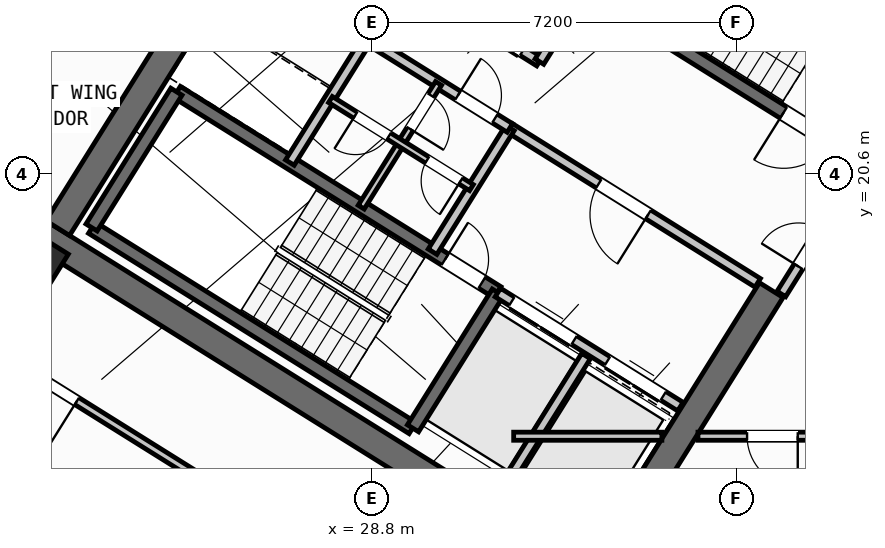
"""IFC4 building model, lengths in metres.
Left out: names, types, materials, properties, quantities, classifications, styles, units other than length and angle.
Written with IfcOpenShell. Run it as: python <this file> out.ifc"""

import sys

from ifc_helpers import new_model, si_unit, direction, frame, frame_2d, origin, origin_2d, place, context, subcontext, project, spatial, rectangle, hollow_rectangle, extrude, source, transform, mapped, element, fill, save


model = new_model("IFC4")
c1 = context("Model", 3, precision=1e-05, world=origin(), true_north=direction((0.0, 1.0)))
c2 = subcontext(c1, "Body", "Model", "MODEL_VIEW")
j1 = project(units=[si_unit("LENGTHUNIT", "METRE"), si_unit("PLANEANGLEUNIT", "RADIAN")], contexts=[c1])
p1 = place(None, origin())
s1 = spatial("IfcSite", under=j1, at=p1, CompositionType="ELEMENT")
p2 = place(p1, origin())
s2 = spatial("IfcBuilding", under=s1, at=p2, CompositionType="ELEMENT")
p3 = place(p2, frame((0.0, 0.0, 155.1)))
s3 = spatial("IfcBuildingStorey", under=s2, at=p3, CompositionType="ELEMENT", Elevation=155.1)
p4 = place(p3, frame((33.366, 12.477, 0.0), z_axis=(0.0, 0.0, 1.0), x_axis=(-0.848047359947, 0.529920442413, 0.0)))
e1 = element("IfcWall", 1, at=p4, inside=s3, PredefinedType="SHEAR", context=c2, shape_type="SweptSolid", body=[
    extrude(rectangle(XDim=13.14, YDim=0.55, at=frame_2d((6.57, 0.0))), origin(), (0.0, 0.0, 1.0), 3.35),
])
p5 = place(p3, frame((36.683, 18.304, 0.0), z_axis=(0.0, 0.0, 1.0), x_axis=(-0.529896466841, -0.848062341122, 0.0)))
e2 = element("IfcWall", 2, at=p5, inside=s3, PredefinedType="SHEAR", context=c2, shape_type="SweptSolid", body=[
    extrude(rectangle(XDim=6.425, YDim=0.55, at=frame_2d((3.212, 0.0))), origin(), (0.0, 0.0, 1.0), 3.35),
])
p6 = place(p3, frame((26.007, 24.976, 0.0), z_axis=(0.0, 0.0, 1.0), x_axis=(-0.529923795287, -0.848045264823, 0.0)))
e3 = element("IfcWall", 3, at=p6, inside=s3, PredefinedType="SHEAR", context=c2, shape_type="SweptSolid", body=[
    extrude(rectangle(XDim=6.425, YDim=0.55, at=frame_2d((3.212, 0.0))), origin(), (0.0, 0.0, 1.0), 3.35),
])
m1 = source(origin(), c2, "Body", "SweptSolid", [
    extrude(hollow_rectangle(XDim=0.9, YDim=0.9, WallThickness=0.036, at=origin_2d()), origin(), (0.0, 0.0, 1.0), 3.6),
])
p7 = place(p3, frame((22.191, 18.87, 0.0), z_axis=(0.0, 0.0, 1.0), x_axis=(-0.848048096156, 0.529919264233, 0.0)))
e4 = element("IfcColumn", 4, at=p7, inside=s3, PredefinedType="COLUMN", context=c2, shape_type="MappedRepresentation", body=[
    mapped(m1, transform((0.0, 0.0, 0.0), scale=1.0)),
])
p8 = place(p3, frame((29.268, 6.429, 0.0), z_axis=(0.0, 0.0, 1.0), x_axis=(-0.848049971435, 0.529916263149, 0.0)))
e5 = element("IfcWall", 5, at=p8, inside=s3, PredefinedType="STANDARD", context=c2, shape_type="SweptSolid", body=[
    extrude(rectangle(XDim=31.588, YDim=0.32, at=frame_2d((15.794, 0.0))), origin(), (0.0, 0.0, 1.0), 3.35),
])
p9 = place(p8, frame((16.362, 0.0, 0.0)))
e6 = element("IfcOpeningElement", 6, at=p9, cuts=e5, PredefinedType="OPENING", context=c2, shape_type="SweptSolid", body=[
    extrude(rectangle(XDim=1.2, YDim=2.15, at=frame_2d((0.6, 1.075))), frame((0.0, 0.17, 0.0), z_axis=(0.0, -1.0, 0.0), x_axis=(1.0, 0.0, 0.0)), (0.0, 0.0, 1.0), 0.34),
])
p10 = place(p8, frame((2.989, 0.0, 0.8)))
e7 = element("IfcOpeningElement", 7, at=p10, cuts=e5, PredefinedType="OPENING", context=c2, shape_type="SweptSolid", body=[
    extrude(rectangle(XDim=2.1, YDim=1.55, at=frame_2d((1.05, 0.775))), frame((0.0, 0.17, 0.0), z_axis=(0.0, -1.0, 0.0), x_axis=(1.0, 0.0, 0.0)), (0.0, 0.0, 1.0), 0.34),
])
p11 = place(p8, frame((8.359, 0.0, 0.8)))
e8 = element("IfcOpeningElement", 8, at=p11, cuts=e5, PredefinedType="OPENING", context=c2, shape_type="SweptSolid", body=[
    extrude(rectangle(XDim=2.1, YDim=1.55, at=frame_2d((1.05, 0.775))), frame((0.0, 0.17, 0.0), z_axis=(0.0, -1.0, 0.0), x_axis=(1.0, 0.0, 0.0)), (0.0, 0.0, 1.0), 0.34),
])
p12 = place(p8, frame((13.284, 0.0, 0.95)))
e9 = element("IfcOpeningElement", 9, at=p12, cuts=e5, PredefinedType="OPENING", context=c2, shape_type="SweptSolid", body=[
    extrude(rectangle(XDim=1.2, YDim=1.4, at=frame_2d((0.6, 0.7))), frame((0.0, 0.17, 0.0), z_axis=(0.0, -1.0, 0.0), x_axis=(1.0, 0.0, 0.0)), (0.0, 0.0, 1.0), 0.34),
])
p13 = place(p8, frame((20.259, 0.0, 0.95)))
e10 = element("IfcOpeningElement", 10, at=p13, cuts=e5, PredefinedType="OPENING", context=c2, shape_type="SweptSolid", body=[
    extrude(rectangle(XDim=1.2, YDim=1.4, at=frame_2d((0.6, 0.7))), frame((0.0, 0.17, 0.0), z_axis=(0.0, -1.0, 0.0), x_axis=(1.0, 0.0, 0.0)), (0.0, 0.0, 1.0), 0.34),
])
p14 = place(p8, frame((22.929, 0.0, 0.95)))
e11 = element("IfcOpeningElement", 11, at=p14, cuts=e5, PredefinedType="OPENING", context=c2, shape_type="SweptSolid", body=[
    extrude(rectangle(XDim=1.2, YDim=1.4, at=frame_2d((0.6, 0.7))), frame((0.0, 0.17, 0.0), z_axis=(0.0, -1.0, 0.0), x_axis=(1.0, 0.0, 0.0)), (0.0, 0.0, 1.0), 0.34),
])
p15 = place(p8, frame((27.481, 0.0, 0.8)))
e12 = element("IfcOpeningElement", 12, at=p15, cuts=e5, PredefinedType="OPENING", context=c2, shape_type="SweptSolid", body=[
    extrude(rectangle(XDim=2.1, YDim=1.55, at=frame_2d((1.05, 0.775))), frame((0.0, 0.17, 0.0), z_axis=(0.0, -1.0, 0.0), x_axis=(1.0, 0.0, 0.0)), (0.0, 0.0, 1.0), 0.34),
])
p16 = place(p3, frame((29.605, 15.581, 0.0), z_axis=(0.0, 0.0, 1.0), x_axis=(-0.848036911448, 0.529937163087, 0.0)))
e13 = element("IfcWall", 13, at=p16, inside=s3, PredefinedType="SHEAR", context=c2, shape_type="SweptSolid", body=[
    extrude(rectangle(XDim=7.46, YDim=0.26, at=frame_2d((3.73, 0.0))), origin(), (0.0, 0.0, 1.0), 3.35),
])
p17 = place(p3, frame((31.28, 18.261, 0.0), z_axis=(0.0, 0.0, 1.0), x_axis=(-0.848051618787, 0.529913626805, 0.0)))
e14 = element("IfcWall", 14, at=p17, inside=s3, PredefinedType="SHEAR", context=c2, shape_type="SweptSolid", body=[
    extrude(rectangle(XDim=7.46, YDim=0.26, at=frame_2d((3.73, 0.0))), origin(), (0.0, 0.0, 1.0), 3.35),
])
p18 = place(p17, frame((0.36, 0.0, 0.0)))
e15 = element("IfcOpeningElement", 15, at=p18, cuts=e14, PredefinedType="OPENING", context=c2, shape_type="SweptSolid", body=[
    extrude(rectangle(XDim=0.86, YDim=2.05, at=frame_2d((0.43, 1.025))), frame((0.0, 0.14, 0.0), z_axis=(0.0, -1.0, 0.0), x_axis=(1.0, 0.0, 0.0)), (0.0, 0.0, 1.0), 0.28),
])
p19 = place(p3, frame((31.288, 18.256, 0.0), z_axis=(0.0, 0.0, 1.0), x_axis=(-0.529943379326, -0.848033026897, 0.0)))
e16 = element("IfcWall", 16, at=p19, inside=s3, PredefinedType="SHEAR", context=c2, shape_type="SweptSolid", body=[
    extrude(rectangle(XDim=3.16, YDim=0.26, at=frame_2d((1.58, 0.0))), origin(), (0.0, 0.0, 1.0), 3.35),
])
p20 = place(p3, frame((24.945, 22.22, 0.0), z_axis=(0.0, 0.0, 1.0), x_axis=(-0.529908658664, -0.84805472316, 0.0)))
e17 = element("IfcWall", 17, at=p20, inside=s3, PredefinedType="SHEAR", context=c2, shape_type="SweptSolid", body=[
    extrude(rectangle(XDim=3.16, YDim=0.26, at=frame_2d((1.58, 0.0))), origin(), (0.0, 0.0, 1.0), 3.35),
])
p21 = place(p3, frame((38.046, 21.108, 0.0), z_axis=(0.0, 0.0, 1.0), x_axis=(-0.848054434086, 0.529909121291, 0.0)))
e18 = element("IfcWall", 18, at=p21, inside=s3, PredefinedType="SHEAR", context=c2, shape_type="SweptSolid", body=[
    extrude(rectangle(XDim=7.33, YDim=0.26, at=frame_2d((3.665, 0.0))), origin(), (0.0, 0.0, 1.0), 3.35),
])
p22 = place(p21, frame((0.22, 0.0, 0.0)))
e19 = element("IfcOpeningElement", 19, at=p22, cuts=e18, PredefinedType="OPENING", context=c2, shape_type="SweptSolid", body=[
    extrude(rectangle(XDim=1.1, YDim=2.1, at=frame_2d((0.55, 1.05))), frame((0.0, 0.14, 0.0), z_axis=(0.0, -1.0, 0.0), x_axis=(1.0, 0.0, 0.0)), (0.0, 0.0, 1.0), 0.28),
])
p23 = place(p3, frame((34.891, 16.005, 0.0), z_axis=(0.0, 0.0, 1.0), x_axis=(-0.848062873452, 0.529895614884, 0.0)))
e20 = element("IfcWall", 20, at=p23, inside=s3, PredefinedType="STANDARD", context=c2, shape_type="SweptSolid", body=[
    extrude(rectangle(XDim=4.248, YDim=0.2, at=frame_2d((2.124, 0.0))), origin(), (0.0, 0.0, 1.0), 3.34),
])
p24 = place(p23, frame((0.398, 0.0, 0.0)))
e21 = element("IfcOpeningElement", 21, at=p24, cuts=e20, PredefinedType="OPENING", context=c2, shape_type="SweptSolid", body=[
    extrude(rectangle(XDim=1.3, YDim=2.2, at=frame_2d((0.65, 1.1))), frame((0.0, 0.11, 0.0), z_axis=(0.0, -1.0, 0.0), x_axis=(1.0, 0.0, 0.0)), (0.0, 0.0, 1.0), 0.22),
])
p25 = place(p23, frame((2.473, 0.0, 0.0)))
e22 = element("IfcOpeningElement", 22, at=p25, cuts=e20, PredefinedType="OPENING", context=c2, shape_type="SweptSolid", body=[
    extrude(rectangle(XDim=1.45, YDim=2.25, at=frame_2d((0.725, 1.125))), frame((0.0, 0.11, 0.0), z_axis=(0.0, -1.0, 0.0), x_axis=(1.0, 0.0, 0.0)), (0.0, 0.0, 1.0), 0.22),
])
p26 = place(p3, frame((36.417, 18.447, 0.0), z_axis=(0.0, 0.0, 1.0), x_axis=(-0.848064879198, 0.529892404805, 0.0)))
e23 = element("IfcWall", 23, at=p26, inside=s3, PredefinedType="STANDARD", context=c2, shape_type="SweptSolid", body=[
    extrude(rectangle(XDim=5.768, YDim=0.2, at=frame_2d((2.884, 0.0))), origin(), (0.0, 0.0, 1.0), 3.34),
])
p27 = place(p26, frame((2.548, 0.0, 0.0)))
e24 = element("IfcOpeningElement", 24, at=p27, cuts=e23, PredefinedType="OPENING", context=c2, shape_type="SweptSolid", body=[
    extrude(rectangle(XDim=1.15, YDim=2.1, at=frame_2d((0.575, 1.05))), frame((0.0, 0.11, 0.0), z_axis=(0.0, -1.0, 0.0), x_axis=(1.0, 0.0, 0.0)), (0.0, 0.0, 1.0), 0.22),
])
p28 = place(p3, frame((32.108, 22.814, 0.0), z_axis=(0.0, 0.0, 1.0), x_axis=(-0.848042229521, 0.529928652696, 0.0)))
e25 = element("IfcWall", 25, at=p28, inside=s3, PredefinedType="STANDARD", context=c2, shape_type="SweptSolid", body=[
    extrude(rectangle(XDim=5.62, YDim=0.2, at=frame_2d((2.81, 0.0))), origin(), (0.0, 0.0, 1.0), 3.34),
])
p29 = place(p28, frame((0.39, 0.0, 0.0)))
e26 = element("IfcOpeningElement", 26, at=p29, cuts=e25, PredefinedType="OPENING", context=c2, shape_type="SweptSolid", body=[
    extrude(rectangle(XDim=1.1, YDim=2.15, at=frame_2d((0.55, 1.075))), frame((0.0, 0.11, 0.0), z_axis=(0.0, -1.0, 0.0), x_axis=(1.0, 0.0, 0.0)), (0.0, 0.0, 1.0), 0.22),
])
p30 = place(p28, frame((2.25, 0.0, 0.0)))
e27 = element("IfcOpeningElement", 27, at=p30, cuts=e25, PredefinedType="OPENING", context=c2, shape_type="SweptSolid", body=[
    extrude(rectangle(XDim=1.1, YDim=2.15, at=frame_2d((0.55, 1.075))), frame((0.0, 0.11, 0.0), z_axis=(0.0, -1.0, 0.0), x_axis=(1.0, 0.0, 0.0)), (0.0, 0.0, 1.0), 0.22),
])
p31 = place(p28, frame((4.11, 0.0, 0.0)))
e28 = element("IfcOpeningElement", 28, at=p31, cuts=e25, PredefinedType="OPENING", context=c2, shape_type="SweptSolid", body=[
    extrude(rectangle(XDim=1.1, YDim=2.15, at=frame_2d((0.55, 1.075))), frame((0.0, 0.11, 0.0), z_axis=(0.0, -1.0, 0.0), x_axis=(1.0, 0.0, 0.0)), (0.0, 0.0, 1.0), 0.22),
])
p32 = place(p3, frame((32.982, 24.213, 0.0), z_axis=(0.0, 0.0, 1.0), x_axis=(-0.529839334948, -0.84809803628, 0.0)))
e29 = element("IfcWall", 29, at=p32, inside=s3, PredefinedType="STANDARD", context=c2, shape_type="SweptSolid", body=[
    extrude(rectangle(XDim=1.65, YDim=0.2, at=frame_2d((0.825, 0.0))), origin(), (0.0, 0.0, 1.0), 3.34),
])
p33 = place(p3, frame((33.029, 17.003, 0.0), z_axis=(0.0, 0.0, 1.0), x_axis=(-0.529916267533, -0.848049968695, 0.0)))
e30 = element("IfcWall", 30, at=p33, inside=s3, PredefinedType="STANDARD", context=c2, shape_type="SweptSolid", body=[
    extrude(rectangle(XDim=2.92, YDim=0.2, at=frame_2d((1.46, 0.0))), origin(), (0.0, 0.0, 1.0), 3.34),
])
for number, where, z_axis, x_axis in (
    (31, (31.525, 21.504, 0.0), (0.0, 0.0, 1.0), (-0.53, -0.848, 0.0)),
    (32, (28.71, 23.263, 0.0), (0.0, 0.0, 1.0), (-0.53, -0.848, 0.0)),
):
    element("IfcWall", number, at=place(p3, frame(where, z_axis=z_axis, x_axis=x_axis)), inside=s3, PredefinedType="STANDARD", context=c2, shape_type="SweptSolid", body=[
        extrude(rectangle(XDim=2.88, YDim=0.2, at=frame_2d((1.44, 0.0))), origin(), (0.0, 0.0, 1.0), 3.34),
    ])
p34 = place(p3, frame((31.525, 21.504, 0.0), z_axis=(0.0, 0.0, 1.0), x_axis=(-0.848040211232, 0.529931882541, 0.0)))
e33 = element("IfcWall", 33, at=p34, inside=s3, PredefinedType="STANDARD", context=c2, shape_type="SweptSolid", body=[
    extrude(rectangle(XDim=6.218, YDim=0.2, at=frame_2d((3.109, 0.0))), origin(), (0.0, 0.0, 1.0), 3.34),
])
p35 = place(p34, frame((4.4, 0.0, 0.0)))
e34 = element("IfcOpeningElement", 34, at=p35, cuts=e33, PredefinedType="OPENING", context=c2, shape_type="SweptSolid", body=[
    extrude(rectangle(XDim=0.86, YDim=2.05, at=frame_2d((0.43, 1.025))), frame((0.0, 0.11, 0.0), z_axis=(0.0, -1.0, 0.0), x_axis=(1.0, 0.0, 0.0)), (0.0, 0.0, 1.0), 0.22),
])
p36 = place(p34, frame((0.35, 0.0, 0.0)))
e35 = element("IfcOpeningElement", 35, at=p36, cuts=e33, PredefinedType="OPENING", context=c2, shape_type="SweptSolid", body=[
    extrude(rectangle(XDim=0.86, YDim=2.05, at=frame_2d((0.43, 1.025))), frame((0.0, 0.11, 0.0), z_axis=(0.0, -1.0, 0.0), x_axis=(1.0, 0.0, 0.0)), (0.0, 0.0, 1.0), 0.22),
])
p37 = place(p3, frame((30.117, 22.384, 0.0), z_axis=(0.0, 0.0, 1.0), x_axis=(-0.529951914384, -0.848027693204, 0.0)))
e36 = element("IfcWall", 36, at=p37, inside=s3, PredefinedType="PLUMBINGWALL", context=c2, shape_type="SweptSolid", body=[
    extrude(rectangle(XDim=1.4, YDim=0.14, at=frame_2d((0.7, 0.0))), origin(), (0.0, 0.0, 1.0), 3.34),
])
p38 = place(p37, frame((0.28, 0.0, 0.0)))
e37 = element("IfcOpeningElement", 37, at=p38, cuts=e36, PredefinedType="OPENING", context=c2, shape_type="SweptSolid", body=[
    extrude(rectangle(XDim=0.78, YDim=2.05, at=frame_2d((0.39, 1.025))), frame((0.0, 0.08, 0.0), z_axis=(0.0, -1.0, 0.0), x_axis=(1.0, 0.0, 0.0)), (0.0, 0.0, 1.0), 0.16),
])
p39 = place(p3, frame((29.375, 21.196, 0.0), z_axis=(0.0, 0.0, 1.0), x_axis=(-0.529865479138, -0.848081702443, 0.0)))
e38 = element("IfcWall", 38, at=p39, inside=s3, PredefinedType="PLUMBINGWALL", context=c2, shape_type="SweptSolid", body=[
    extrude(rectangle(XDim=1.48, YDim=0.14, at=frame_2d((0.74, 0.0))), origin(), (0.0, 0.0, 1.0), 3.34),
])
p40 = place(p3, frame((30.766, 20.327, 0.0), z_axis=(0.0, 0.0, 1.0), x_axis=(-0.848052663127, 0.529911955482, 0.0)))
e39 = element("IfcWall", 39, at=p40, inside=s3, PredefinedType="PLUMBINGWALL", context=c2, shape_type="SweptSolid", body=[
    extrude(rectangle(XDim=3.28, YDim=0.14, at=frame_2d((1.64, 0.0))), origin(), (0.0, 0.0, 1.0), 3.34),
])
p41 = place(p40, frame((0.25, 0.0, 0.0)))
e40 = element("IfcOpeningElement", 40, at=p41, cuts=e39, PredefinedType="OPENING", context=c2, shape_type="SweptSolid", body=[
    extrude(rectangle(XDim=0.78, YDim=2.05, at=frame_2d((0.39, 1.025))), frame((0.0, 0.08, 0.0), z_axis=(0.0, -1.0, 0.0), x_axis=(1.0, 0.0, 0.0)), (0.0, 0.0, 1.0), 0.16),
])
p42 = place(p40, frame((1.92, 0.0, 0.0)))
e41 = element("IfcOpeningElement", 41, at=p42, cuts=e39, PredefinedType="OPENING", context=c2, shape_type="SweptSolid", body=[
    extrude(rectangle(XDim=0.78, YDim=2.05, at=frame_2d((0.39, 1.025))), frame((0.0, 0.08, 0.0), z_axis=(0.0, -1.0, 0.0), x_axis=(1.0, 0.0, 0.0)), (0.0, 0.0, 1.0), 0.16),
])
p43 = place(p3, frame((32.164, 10.374, 0.0), z_axis=(0.0, 0.0, 1.0), x_axis=(-0.848044107957, 0.529925646633, 0.0)))
e42 = element("IfcWall", 42, at=p43, inside=s3, PredefinedType="PARTITIONING", context=c2, shape_type="SweptSolid", body=[
    extrude(rectangle(XDim=15.57, YDim=0.16, at=frame_2d((7.785, 0.0))), origin(), (0.0, 0.0, 1.0), 3.34),
])
p44 = place(p43, frame((10.83, 0.0, 0.0)))
e43 = element("IfcOpeningElement", 43, at=p44, cuts=e42, PredefinedType="OPENING", context=c2, shape_type="SweptSolid", body=[
    extrude(rectangle(XDim=1.0, YDim=2.1, at=frame_2d((0.5, 1.05))), frame((0.0, 0.09, 0.0), z_axis=(0.0, -1.0, 0.0), x_axis=(1.0, 0.0, 0.0)), (0.0, 0.0, 1.0), 0.18),
])
p45 = place(p3, frame((29.72, 8.859, 0.0), z_axis=(0.0, 0.0, 1.0), x_axis=(-0.848049134363, 0.529917602752, 0.0)))
e44 = element("IfcWall", 44, at=p45, inside=s3, PredefinedType="PLUMBINGWALL", context=c2, shape_type="SweptSolid", body=[
    extrude(rectangle(XDim=14.3, YDim=0.14, at=frame_2d((7.15, 0.0))), origin(), (0.0, 0.0, 1.0), 3.34),
])
p46 = place(p45, frame((9.57, 0.0, 0.0)))
e45 = element("IfcOpeningElement", 45, at=p46, cuts=e44, PredefinedType="OPENING", context=c2, shape_type="SweptSolid", body=[
    extrude(rectangle(XDim=0.92, YDim=2.08, at=frame_2d((0.46, 1.04))), frame((0.0, 0.08, 0.0), z_axis=(0.0, -1.0, 0.0), x_axis=(1.0, 0.0, 0.0)), (0.0, 0.0, 1.0), 0.16),
])
p47 = place(p3, frame((38.451, 20.737, 0.0), z_axis=(0.0, 0.0, 1.0), x_axis=(-0.529924799939, -0.848044637038, 0.0)))
e46 = element("IfcWall", 46, at=p47, inside=s3, PredefinedType="STANDARD", context=c2, shape_type="SweptSolid", body=[
    extrude(rectangle(XDim=2.96, YDim=0.2, at=frame_2d((1.48, 0.0))), origin(), (0.0, 0.0, 1.0), 3.34),
])
p48 = place(p47, frame((1.46, 0.0, 0.0)))
e47 = element("IfcOpeningElement", 47, at=p48, cuts=e46, PredefinedType="OPENING", context=c2, shape_type="SweptSolid", body=[
    extrude(rectangle(XDim=0.86, YDim=2.05, at=frame_2d((0.43, 1.025))), frame((0.0, 0.11, 0.0), z_axis=(0.0, -1.0, 0.0), x_axis=(1.0, 0.0, 0.0)), (0.0, 0.0, 1.0), 0.22),
])
p49 = place(p3, frame((31.6, 15.42, 0.0), z_axis=(0.0, 0.0, 1.0), x_axis=(1.0, 0.0, 0.0)))
e48 = element("IfcWall", 48, at=p49, inside=s3, PredefinedType="PARTITIONING", context=c2, shape_type="SweptSolid", body=[
    extrude(rectangle(XDim=2.925, YDim=0.16, at=frame_2d((1.462, 0.0))), origin(), (0.0, 0.0, 1.0), 3.34),
])
p50 = place(p3, frame((35.237, 15.42, 0.0), z_axis=(0.0, 0.0, 1.0), x_axis=(1.0, 0.0, 0.0)))
e49 = element("IfcWall", 49, at=p50, inside=s3, PredefinedType="PARTITIONING", context=c2, shape_type="SweptSolid", body=[
    extrude(rectangle(XDim=15.432, YDim=0.16, at=frame_2d((7.716, 0.0))), origin(), (0.0, 0.0, 1.0), 3.34),
])
p51 = place(p50, frame((0.969, 0.0, 0.0)))
e50 = element("IfcOpeningElement", 50, at=p51, cuts=e49, PredefinedType="OPENING", context=c2, shape_type="SweptSolid", body=[
    extrude(rectangle(XDim=1.0, YDim=2.1, at=frame_2d((0.5, 1.05))), frame((0.0, 0.09, 0.0), z_axis=(0.0, -1.0, 0.0), x_axis=(1.0, 0.0, 0.0)), (0.0, 0.0, 1.0), 0.18),
])
p52 = place(p50, frame((8.799, 0.0, 0.0)))
e51 = element("IfcOpeningElement", 51, at=p52, cuts=e49, PredefinedType="OPENING", context=c2, shape_type="SweptSolid", body=[
    extrude(rectangle(XDim=1.0, YDim=2.1, at=frame_2d((0.5, 1.05))), frame((0.0, 0.09, 0.0), z_axis=(0.0, -1.0, 0.0), x_axis=(1.0, 0.0, 0.0)), (0.0, 0.0, 1.0), 0.18),
])
m2 = source(origin(), c2, "Body", "SweptSolid", [
    extrude(rectangle(XDim=0.86, YDim=2.05, at=frame_2d((0.43, 1.025))), frame((0.0, 0.025, 0.0), z_axis=(0.0, -1.0, 0.0), x_axis=(1.0, 0.0, 0.0)), (0.0, 0.0, 1.0), 0.05),
])
p53 = place(p18, frame((0.86, 0.0, 0.0), z_axis=(0.0, 0.0, 1.0), x_axis=(-1.0, 0.0, 0.0)))
e52 = element("IfcDoor", 52, at=p53, inside=s3, OperationType="SINGLE_SWING_LEFT", PredefinedType="DOOR", context=c2, shape_type="MappedRepresentation", body=[
    mapped(m2, transform((0.0, 0.0, 0.0), scale=1.0)),
])
fill(e15, e52)
m3 = source(origin(), c2, "Body", "SweptSolid", [
    extrude(rectangle(XDim=1.1, YDim=2.1, at=frame_2d((0.55, 1.05))), frame((0.0, 0.025, 0.0), z_axis=(0.0, -1.0, 0.0), x_axis=(1.0, 0.0, 0.0)), (0.0, 0.0, 1.0), 0.05),
])
p54 = place(p22, origin())
e53 = element("IfcDoor", 53, at=p54, inside=s3, OperationType="SINGLE_SWING_RIGHT", PredefinedType="DOOR", context=c2, shape_type="MappedRepresentation", body=[
    mapped(m3, transform((0.0, 0.0, 0.0), scale=1.0)),
])
fill(e19, e53)
m4 = source(origin(), c2, "Body", "SweptSolid", [
    extrude(rectangle(XDim=1.15, YDim=2.1, at=frame_2d((0.575, 1.05))), frame((0.0, 0.025, 0.0), z_axis=(0.0, -1.0, 0.0), x_axis=(1.0, 0.0, 0.0)), (0.0, 0.0, 1.0), 0.05),
])
p55 = place(p27, origin())
e54 = element("IfcDoor", 54, at=p55, inside=s3, OperationType="SINGLE_SWING_LEFT", PredefinedType="DOOR", context=c2, shape_type="MappedRepresentation", body=[
    mapped(m4, transform((0.0, 0.0, 0.0), scale=1.0)),
])
fill(e24, e54)
m5 = source(origin(), c2, "Body", "SweptSolid", [
    extrude(rectangle(XDim=1.3, YDim=2.2, at=frame_2d((0.65, 1.1))), frame((0.0, 0.025, 0.0), z_axis=(0.0, -1.0, 0.0), x_axis=(1.0, 0.0, 0.0)), (0.0, 0.0, 1.0), 0.05),
])
p56 = place(p24, origin())
e55 = element("IfcDoor", 55, at=p56, inside=s3, OperationType="DOUBLE_DOOR_SLIDING", PredefinedType="DOOR", context=c2, shape_type="MappedRepresentation", body=[
    mapped(m5, transform((0.0, 0.0, 0.0), scale=1.0)),
])
fill(e21, e55)
m6 = source(origin(), c2, "Body", "SweptSolid", [
    extrude(rectangle(XDim=1.45, YDim=2.25, at=frame_2d((0.725, 1.125))), frame((0.0, 0.025, 0.0), z_axis=(0.0, -1.0, 0.0), x_axis=(1.0, 0.0, 0.0)), (0.0, 0.0, 1.0), 0.05),
])
p57 = place(p25, origin())
e56 = element("IfcDoor", 56, at=p57, inside=s3, OperationType="DOUBLE_DOOR_SLIDING", PredefinedType="DOOR", context=c2, shape_type="MappedRepresentation", body=[
    mapped(m6, transform((0.0, 0.0, 0.0), scale=1.0)),
])
fill(e22, e56)
p58 = place(p36, frame((0.86, 0.0, 0.0), z_axis=(0.0, 0.0, 1.0), x_axis=(-1.0, 0.0, 0.0)))
e57 = element("IfcDoor", 57, at=p58, inside=s3, OperationType="SINGLE_SWING_LEFT", PredefinedType="DOOR", context=c2, shape_type="MappedRepresentation", body=[
    mapped(m2, transform((0.0, 0.0, 0.0), scale=1.0)),
])
fill(e35, e57)
m7 = source(origin(), c2, "Body", "SweptSolid", [
    extrude(rectangle(XDim=0.78, YDim=2.05, at=frame_2d((0.39, 1.025))), frame((0.0, 0.025, 0.0), z_axis=(0.0, -1.0, 0.0), x_axis=(1.0, 0.0, 0.0)), (0.0, 0.0, 1.0), 0.05),
])
p59 = place(p38, origin())
e58 = element("IfcDoor", 58, at=p59, inside=s3, OperationType="SINGLE_SWING_RIGHT", PredefinedType="DOOR", context=c2, shape_type="MappedRepresentation", body=[
    mapped(m7, transform((0.0, 0.0, 0.0), scale=1.0)),
])
fill(e37, e58)
p60 = place(p41, origin())
e59 = element("IfcDoor", 59, at=p60, inside=s3, OperationType="SINGLE_SWING_LEFT", PredefinedType="DOOR", context=c2, shape_type="MappedRepresentation", body=[
    mapped(m7, transform((0.0, 0.0, 0.0), scale=1.0)),
])
fill(e40, e59)
p61 = place(p42, origin())
e60 = element("IfcDoor", 60, at=p61, inside=s3, OperationType="SINGLE_SWING_RIGHT", PredefinedType="DOOR", context=c2, shape_type="MappedRepresentation", body=[
    mapped(m7, transform((0.0, 0.0, 0.0), scale=1.0)),
])
fill(e41, e60)
m8 = source(origin(), c2, "Body", "SweptSolid", [
    extrude(rectangle(XDim=1.0, YDim=2.1, at=frame_2d((0.5, 1.05))), frame((0.0, 0.025, 0.0), z_axis=(0.0, -1.0, 0.0), x_axis=(1.0, 0.0, 0.0)), (0.0, 0.0, 1.0), 0.05),
])
p62 = place(p44, origin())
e61 = element("IfcDoor", 61, at=p62, inside=s3, OperationType="SINGLE_SWING_LEFT", PredefinedType="DOOR", context=c2, shape_type="MappedRepresentation", body=[
    mapped(m8, transform((0.0, 0.0, 0.0), scale=1.0)),
])
fill(e43, e61)
p63 = place(p48, frame((0.86, 0.0, 0.0), z_axis=(0.0, 0.0, 1.0), x_axis=(-1.0, 0.0, 0.0)))
e62 = element("IfcDoor", 62, at=p63, inside=s3, OperationType="SINGLE_SWING_LEFT", PredefinedType="DOOR", context=c2, shape_type="MappedRepresentation", body=[
    mapped(m2, transform((0.0, 0.0, 0.0), scale=1.0)),
])
fill(e47, e62)
p64 = place(p51, frame((1.0, 0.0, 0.0), z_axis=(0.0, 0.0, 1.0), x_axis=(-1.0, 0.0, 0.0)))
e63 = element("IfcDoor", 63, at=p64, inside=s3, OperationType="SINGLE_SWING_LEFT", PredefinedType="DOOR", context=c2, shape_type="MappedRepresentation", body=[
    mapped(m8, transform((0.0, 0.0, 0.0), scale=1.0)),
])
fill(e50, e63)
save(model, sys.argv[1])
